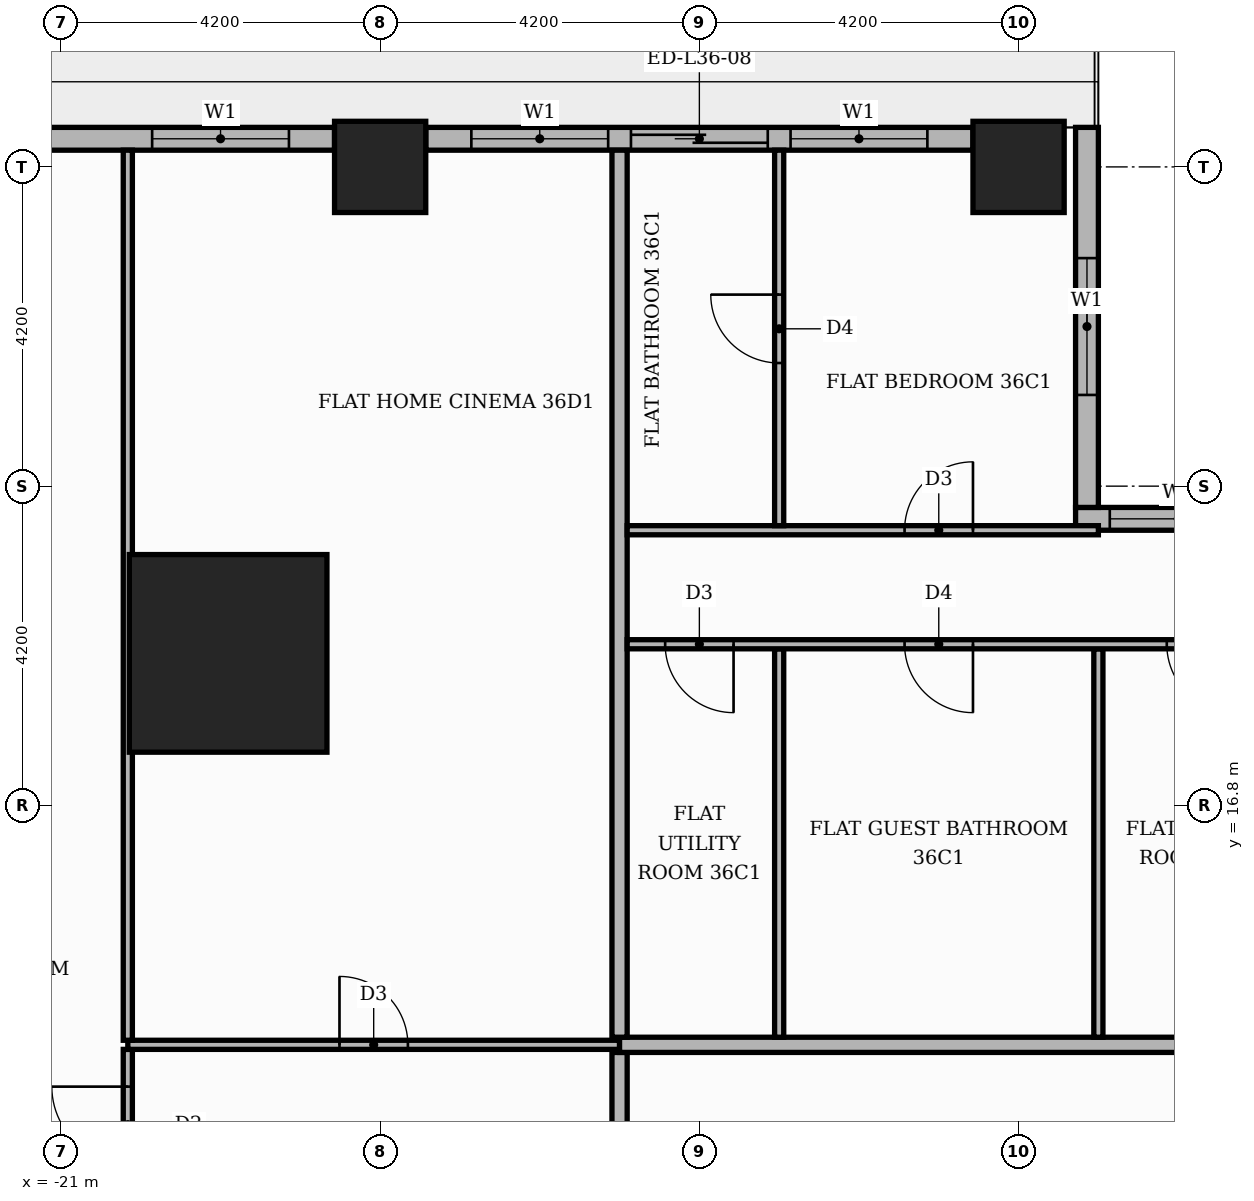
"""IFC4 building model, lengths in metres.
Left out: names, types, materials, properties, quantities, classifications, styles, units other than length and angle.
Written with IfcOpenShell. Run it as: python <this file> out.ifc"""

import sys

from ifc_helpers import new_model, si_unit, direction, frame, frame_2d, origin, origin_2d, place, context, subcontext, project, spatial, rectangle, extrude, element, fill, save


model = new_model("IFC4")
c1 = context("Model", 3, precision=1e-05, world=origin(), true_north=direction((0.0, 1.0)))
c2 = subcontext(c1, "Body", "Model", "MODEL_VIEW")
j1 = project(units=[si_unit("LENGTHUNIT", "METRE"), si_unit("PLANEANGLEUNIT", "RADIAN")], contexts=[c1])
p1 = place(None, origin())
s1 = spatial("IfcSite", under=j1, at=p1, CompositionType="ELEMENT")
p2 = place(p1, origin())
s2 = spatial("IfcBuilding", under=s1, at=p2, CompositionType="ELEMENT")
p3 = place(p2, frame((0.0, 0.0, 153.3)))
s3 = spatial("IfcBuildingStorey", under=s2, at=p3, CompositionType="ELEMENT", Elevation=153.3)
p4 = place(p3, frame((-18.8, 18.8, 0.0), z_axis=(0.0, 0.0, 1.0), x_axis=(1.0, 0.0, 0.0)))
e1 = element("IfcColumn", 1, at=p4, inside=s3, PredefinedType="COLUMN", context=c2, shape_type="SweptSolid", body=[
    extrude(rectangle(XDim=2.6, YDim=2.6, at=origin_2d()), origin(), (0.0, 0.0, 1.0), 3.9),
])
for number, where, z_axis, x_axis in (
    (2, (-8.4, 25.2, 0.0), (0.0, 0.0, 1.0), (1.0, 0.0, 0.0)),
    (3, (-16.8, 25.2, 0.0), (0.0, 0.0, 1.0), (1.0, 0.0, 0.0)),
):
    element("IfcColumn", number, at=place(p3, frame(where, z_axis=z_axis, x_axis=x_axis)), inside=s3, PredefinedType="COLUMN", context=c2, shape_type="SweptSolid", body=[
        extrude(rectangle(XDim=1.2, YDim=1.2, at=origin_2d()), origin(), (0.0, 0.0, 1.0), 3.9),
    ])
p5 = place(p3, frame((7.35, 20.57, 0.0), z_axis=(0.0, 0.0, 1.0), x_axis=(-1.0, 0.0, 0.0)))
e4 = element("IfcWall", 4, at=p5, inside=s3, PredefinedType="STANDARD", context=c2, shape_type="SweptSolid", body=[
    extrude(rectangle(XDim=15.0, YDim=0.3, at=frame_2d((7.5, 0.0))), origin(), (0.0, 0.0, 1.0), 3.48),
])
p6 = place(p5, frame((0.15, 0.0, 0.9)))
e5 = element("IfcOpeningElement", 5, at=p6, cuts=e4, PredefinedType="OPENING", context=c2, shape_type="SweptSolid", body=[
    extrude(rectangle(XDim=6.0, YDim=2.1, at=frame_2d((3.0, 1.05))), frame((0.0, 0.16, 0.0), z_axis=(0.0, -1.0, 0.0), x_axis=(1.0, 0.0, 0.0)), (0.0, 0.0, 1.0), 0.32),
])
p7 = place(p5, frame((6.45, 0.0, 0.9)))
e6 = element("IfcOpeningElement", 6, at=p7, cuts=e4, PredefinedType="OPENING", context=c2, shape_type="SweptSolid", body=[
    extrude(rectangle(XDim=6.0, YDim=2.1, at=frame_2d((3.0, 1.05))), frame((0.0, 0.16, 0.0), z_axis=(0.0, -1.0, 0.0), x_axis=(1.0, 0.0, 0.0)), (0.0, 0.0, 1.0), 0.32),
])
p8 = place(p5, frame((12.75, 0.0, 0.9)))
e7 = element("IfcOpeningElement", 7, at=p8, cuts=e4, PredefinedType="OPENING", context=c2, shape_type="SweptSolid", body=[
    extrude(rectangle(XDim=1.8, YDim=2.1, at=frame_2d((0.9, 1.05))), frame((0.0, 0.16, 0.0), z_axis=(0.0, -1.0, 0.0), x_axis=(1.0, 0.0, 0.0)), (0.0, 0.0, 1.0), 0.32),
])
p9 = place(p3, frame((-7.5, 20.72, 0.0), z_axis=(0.0, 0.0, 1.0), x_axis=(0.0, 1.0, 0.0)))
e8 = element("IfcWall", 8, at=p9, inside=s3, PredefinedType="STANDARD", context=c2, shape_type="SweptSolid", body=[
    extrude(rectangle(XDim=5.0, YDim=0.3, at=frame_2d((2.5, 0.0))), origin(), (0.0, 0.0, 1.0), 3.48),
])
p10 = place(p9, frame((1.48, 0.0, 0.9)))
e9 = element("IfcOpeningElement", 9, at=p10, cuts=e8, PredefinedType="OPENING", context=c2, shape_type="SweptSolid", body=[
    extrude(rectangle(XDim=1.8, YDim=2.1, at=frame_2d((0.9, 1.05))), frame((0.0, 0.16, 0.0), z_axis=(0.0, -1.0, 0.0), x_axis=(1.0, 0.0, 0.0)), (0.0, 0.0, 1.0), 0.32),
])
p11 = place(p3, frame((-9.0, 25.57, 0.0), z_axis=(0.0, 0.0, 1.0), x_axis=(-1.0, 0.0, 0.0)))
e10 = element("IfcWall", 10, at=p11, inside=s3, PredefinedType="STANDARD", context=c2, shape_type="SweptSolid", body=[
    extrude(rectangle(XDim=7.2, YDim=0.3, at=frame_2d((3.6, 0.0))), origin(), (0.0, 0.0, 1.0), 3.48),
])
p12 = place(p11, frame((0.6, 0.0, 0.9)))
e11 = element("IfcOpeningElement", 11, at=p12, cuts=e10, PredefinedType="OPENING", context=c2, shape_type="SweptSolid", body=[
    extrude(rectangle(XDim=1.8, YDim=2.1, at=frame_2d((0.9, 1.05))), frame((0.0, 0.16, 0.0), z_axis=(0.0, -1.0, 0.0), x_axis=(1.0, 0.0, 0.0)), (0.0, 0.0, 1.0), 0.32),
])
p13 = place(p11, frame((2.7, 0.0, 0.0)))
e12 = element("IfcOpeningElement", 12, at=p13, cuts=e10, PredefinedType="OPENING", context=c2, shape_type="SweptSolid", body=[
    extrude(rectangle(XDim=1.8, YDim=2.4, at=frame_2d((0.9, 1.2))), frame((0.0, 0.16, 0.0), z_axis=(0.0, -1.0, 0.0), x_axis=(1.0, 0.0, 0.0)), (0.0, 0.0, 1.0), 0.32),
])
p14 = place(p11, frame((4.8, 0.0, 0.9)))
e13 = element("IfcOpeningElement", 13, at=p14, cuts=e10, PredefinedType="OPENING", context=c2, shape_type="SweptSolid", body=[
    extrude(rectangle(XDim=1.8, YDim=2.1, at=frame_2d((0.9, 1.05))), frame((0.0, 0.16, 0.0), z_axis=(0.0, -1.0, 0.0), x_axis=(1.0, 0.0, 0.0)), (0.0, 0.0, 1.0), 0.32),
])
p15 = place(p3, frame((-17.4, 25.57, 0.0), z_axis=(0.0, 0.0, 1.0), x_axis=(-1.0, 0.0, 0.0)))
e14 = element("IfcWall", 14, at=p15, inside=s3, PredefinedType="STANDARD", context=c2, shape_type="SweptSolid", body=[
    extrude(rectangle(XDim=4.32, YDim=0.3, at=frame_2d((2.16, 0.0))), origin(), (0.0, 0.0, 1.0), 3.48),
])
p16 = place(p15, frame((0.6, 0.0, 0.9)))
e15 = element("IfcOpeningElement", 15, at=p16, cuts=e14, PredefinedType="OPENING", context=c2, shape_type="SweptSolid", body=[
    extrude(rectangle(XDim=1.8, YDim=2.1, at=frame_2d((0.9, 1.05))), frame((0.0, 0.16, 0.0), z_axis=(0.0, -1.0, 0.0), x_axis=(1.0, 0.0, 0.0)), (0.0, 0.0, 1.0), 0.32),
])
p17 = place(p3, frame((-13.65, 11.1, 0.0), z_axis=(0.0, 0.0, 1.0), x_axis=(0.0, 1.0, 0.0)))
e16 = element("IfcWall", 16, at=p17, inside=s3, PredefinedType="PARTITIONING", context=c2, shape_type="SweptSolid", body=[
    extrude(rectangle(XDim=2.45, YDim=0.2, at=frame_2d((1.225, 0.0))), origin(), (0.0, 0.0, 1.0), 3.48),
])
p18 = place(p3, frame((-20.12, 11.61, 0.0), z_axis=(0.0, 0.0, 1.0), x_axis=(0.0, 1.0, 0.0)))
e17 = element("IfcWall", 17, at=p18, inside=s3, PredefinedType="PARTITIONING", context=c2, shape_type="SweptSolid", body=[
    extrude(rectangle(XDim=1.98, YDim=0.12, at=frame_2d((0.99, 0.0))), origin(), (0.0, 0.0, 1.0), 3.48),
])
p19 = place(p18, frame((0.49, 0.0, 0.0)))
e18 = element("IfcOpeningElement", 18, at=p19, cuts=e17, PredefinedType="OPENING", context=c2, shape_type="SweptSolid", body=[
    extrude(rectangle(XDim=1.0, YDim=2.1, at=frame_2d((0.5, 1.05))), frame((0.0, 0.07, 0.0), z_axis=(0.0, -1.0, 0.0), x_axis=(1.0, 0.0, 0.0)), (0.0, 0.0, 1.0), 0.14),
])
p20 = place(p3, frame((-20.12, 13.65, 0.0), z_axis=(0.0, 0.0, 1.0), x_axis=(1.0, 0.0, 0.0)))
e19 = element("IfcWall", 19, at=p20, inside=s3, PredefinedType="PARTITIONING", context=c2, shape_type="SweptSolid", body=[
    extrude(rectangle(XDim=6.47, YDim=0.12, at=frame_2d((3.235, 0.0))), origin(), (0.0, 0.0, 1.0), 3.48),
])
p21 = place(p20, frame((2.785, 0.0, 0.0)))
e20 = element("IfcOpeningElement", 20, at=p21, cuts=e19, PredefinedType="OPENING", context=c2, shape_type="SweptSolid", body=[
    extrude(rectangle(XDim=0.9, YDim=2.1, at=frame_2d((0.45, 1.05))), frame((0.0, 0.07, 0.0), z_axis=(0.0, -1.0, 0.0), x_axis=(1.0, 0.0, 0.0)), (0.0, 0.0, 1.0), 0.14),
])
p22 = place(p3, frame((-13.65, 13.65, 0.0), z_axis=(0.0, 0.0, 1.0), x_axis=(1.0, 0.0, 0.0)))
e21 = element("IfcWall", 21, at=p22, inside=s3, PredefinedType="PARTITIONING", context=c2, shape_type="SweptSolid", body=[
    extrude(rectangle(XDim=39.07, YDim=0.2, at=frame_2d((19.535, 0.0))), origin(), (0.0, 0.0, 1.0), 3.48),
])
p23 = place(p22, frame((23.6, 0.0, 0.0)))
e22 = element("IfcOpeningElement", 22, at=p23, cuts=e21, PredefinedType="OPENING", context=c2, shape_type="SweptSolid", body=[
    extrude(rectangle(XDim=1.1, YDim=2.4, at=frame_2d((0.55, 1.2))), frame((0.0, 0.11, 0.0), z_axis=(0.0, -1.0, 0.0), x_axis=(1.0, 0.0, 0.0)), (0.0, 0.0, 1.0), 0.22),
])
p24 = place(p3, frame((-20.12, 13.71, 0.0), z_axis=(0.0, 0.0, 1.0), x_axis=(0.0, 1.0, 0.0)))
e23 = element("IfcWall", 23, at=p24, inside=s3, PredefinedType="PARTITIONING", context=c2, shape_type="SweptSolid", body=[
    extrude(rectangle(XDim=11.71, YDim=0.12, at=frame_2d((5.855, 0.0))), origin(), (0.0, 0.0, 1.0), 3.48),
])
p25 = place(p3, frame((-13.65, 13.75, 0.0), z_axis=(0.0, 0.0, 1.0), x_axis=(0.0, 1.0, 0.0)))
e24 = element("IfcWall", 24, at=p25, inside=s3, PredefinedType="PARTITIONING", context=c2, shape_type="SweptSolid", body=[
    extrude(rectangle(XDim=11.67, YDim=0.2, at=frame_2d((5.835, 0.0))), origin(), (0.0, 0.0, 1.0), 3.48),
])
for number, where, z_axis, x_axis in (
    (25, (-11.55, 13.75, 0.0), (0.0, 0.0, 1.0), (0.0, 1.0, 0.0)),
    (26, (-7.35, 13.75, 0.0), (0.0, 0.0, 1.0), (0.0, 1.0, 0.0)),
):
    element("IfcWall", number, at=place(p3, frame(where, z_axis=z_axis, x_axis=x_axis)), inside=s3, PredefinedType="PARTITIONING", context=c2, shape_type="SweptSolid", body=[
        extrude(rectangle(XDim=5.11, YDim=0.12, at=frame_2d((2.555, 0.0))), origin(), (0.0, 0.0, 1.0), 3.48),
    ])
p26 = place(p3, frame((-13.55, 18.92, 0.0), z_axis=(0.0, 0.0, 1.0), x_axis=(1.0, 0.0, 0.0)))
e27 = element("IfcWall", 27, at=p26, inside=s3, PredefinedType="PARTITIONING", context=c2, shape_type="SweptSolid", body=[
    extrude(rectangle(XDim=20.9, YDim=0.12, at=frame_2d((10.45, 0.0))), origin(), (0.0, 0.0, 1.0), 3.48),
])
p27 = place(p26, frame((17.3, 0.0, 0.0)))
e28 = element("IfcOpeningElement", 28, at=p27, cuts=e27, PredefinedType="OPENING", context=c2, shape_type="SweptSolid", body=[
    extrude(rectangle(XDim=0.9, YDim=2.1, at=frame_2d((0.45, 1.05))), frame((0.0, 0.07, 0.0), z_axis=(0.0, -1.0, 0.0), x_axis=(1.0, 0.0, 0.0)), (0.0, 0.0, 1.0), 0.14),
])
p28 = place(p26, frame((11.3, 0.0, 0.0)))
e29 = element("IfcOpeningElement", 29, at=p28, cuts=e27, PredefinedType="OPENING", context=c2, shape_type="SweptSolid", body=[
    extrude(rectangle(XDim=0.9, YDim=2.1, at=frame_2d((0.45, 1.05))), frame((0.0, 0.07, 0.0), z_axis=(0.0, -1.0, 0.0), x_axis=(1.0, 0.0, 0.0)), (0.0, 0.0, 1.0), 0.14),
])
p29 = place(p26, frame((7.1, 0.0, 0.0)))
e30 = element("IfcOpeningElement", 30, at=p29, cuts=e27, PredefinedType="OPENING", context=c2, shape_type="SweptSolid", body=[
    extrude(rectangle(XDim=0.9, YDim=2.1, at=frame_2d((0.45, 1.05))), frame((0.0, 0.07, 0.0), z_axis=(0.0, -1.0, 0.0), x_axis=(1.0, 0.0, 0.0)), (0.0, 0.0, 1.0), 0.14),
])
p30 = place(p26, frame((3.65, 0.0, 0.0)))
e31 = element("IfcOpeningElement", 31, at=p30, cuts=e27, PredefinedType="OPENING", context=c2, shape_type="SweptSolid", body=[
    extrude(rectangle(XDim=0.9, YDim=2.1, at=frame_2d((0.45, 1.05))), frame((0.0, 0.07, 0.0), z_axis=(0.0, -1.0, 0.0), x_axis=(1.0, 0.0, 0.0)), (0.0, 0.0, 1.0), 0.14),
])
p31 = place(p26, frame((0.5, 0.0, 0.0)))
e32 = element("IfcOpeningElement", 32, at=p31, cuts=e27, PredefinedType="OPENING", context=c2, shape_type="SweptSolid", body=[
    extrude(rectangle(XDim=0.9, YDim=2.1, at=frame_2d((0.45, 1.05))), frame((0.0, 0.07, 0.0), z_axis=(0.0, -1.0, 0.0), x_axis=(1.0, 0.0, 0.0)), (0.0, 0.0, 1.0), 0.14),
])
p32 = place(p3, frame((-13.55, 20.42, 0.0), z_axis=(0.0, 0.0, 1.0), x_axis=(1.0, 0.0, 0.0)))
e33 = element("IfcWall", 33, at=p32, inside=s3, PredefinedType="PARTITIONING", context=c2, shape_type="SweptSolid", body=[
    extrude(rectangle(XDim=6.2, YDim=0.12, at=frame_2d((3.1, 0.0))), origin(), (0.0, 0.0, 1.0), 3.48),
])
p33 = place(p32, frame((3.65, 0.0, 0.0)))
e34 = element("IfcOpeningElement", 34, at=p33, cuts=e33, PredefinedType="OPENING", context=c2, shape_type="SweptSolid", body=[
    extrude(rectangle(XDim=0.9, YDim=2.1, at=frame_2d((0.45, 1.05))), frame((0.0, 0.07, 0.0), z_axis=(0.0, -1.0, 0.0), x_axis=(1.0, 0.0, 0.0)), (0.0, 0.0, 1.0), 0.14),
])
p34 = place(p3, frame((-11.55, 20.48, 0.0), z_axis=(0.0, 0.0, 1.0), x_axis=(0.0, 1.0, 0.0)))
e35 = element("IfcWall", 35, at=p34, inside=s3, PredefinedType="PARTITIONING", context=c2, shape_type="SweptSolid", body=[
    extrude(rectangle(XDim=4.94, YDim=0.12, at=frame_2d((2.47, 0.0))), origin(), (0.0, 0.0, 1.0), 3.48),
])
p35 = place(p34, frame((2.14, 0.0, 0.0)))
e36 = element("IfcOpeningElement", 36, at=p35, cuts=e35, PredefinedType="OPENING", context=c2, shape_type="SweptSolid", body=[
    extrude(rectangle(XDim=0.9, YDim=2.1, at=frame_2d((0.45, 1.05))), frame((0.0, 0.07, 0.0), z_axis=(0.0, -1.0, 0.0), x_axis=(1.0, 0.0, 0.0)), (0.0, 0.0, 1.0), 0.14),
])
p36 = place(p8, origin())
e37 = element("IfcWindow", 37, at=p36, inside=s3, PartitioningType="SINGLE_PANEL", PredefinedType="WINDOW", context=c2, shape_type="SweptSolid", body=[
    extrude(rectangle(XDim=1.8, YDim=2.1, at=frame_2d((0.9, 1.05))), frame((0.0, 0.03, 0.0), z_axis=(0.0, -1.0, 0.0), x_axis=(1.0, 0.0, 0.0)), (0.0, 0.0, 1.0), 0.06),
])
fill(e7, e37)
p37 = place(p10, origin())
e38 = element("IfcWindow", 38, at=p37, inside=s3, PartitioningType="SINGLE_PANEL", PredefinedType="WINDOW", context=c2, shape_type="SweptSolid", body=[
    extrude(rectangle(XDim=1.8, YDim=2.1, at=frame_2d((0.9, 1.05))), frame((0.0, 0.03, 0.0), z_axis=(0.0, -1.0, 0.0), x_axis=(1.0, 0.0, 0.0)), (0.0, 0.0, 1.0), 0.06),
])
fill(e9, e38)
p38 = place(p12, origin())
e39 = element("IfcWindow", 39, at=p38, inside=s3, PartitioningType="SINGLE_PANEL", PredefinedType="WINDOW", context=c2, shape_type="SweptSolid", body=[
    extrude(rectangle(XDim=1.8, YDim=2.1, at=frame_2d((0.9, 1.05))), frame((0.0, 0.03, 0.0), z_axis=(0.0, -1.0, 0.0), x_axis=(1.0, 0.0, 0.0)), (0.0, 0.0, 1.0), 0.06),
])
fill(e11, e39)
p39 = place(p13, origin())
e40 = element("IfcDoor", 40, at=p39, inside=s3, OperationType="SLIDING_TO_RIGHT", PredefinedType="DOOR", context=c2, shape_type="SweptSolid", body=[
    extrude(rectangle(XDim=1.8, YDim=2.4, at=frame_2d((0.9, 1.2))), frame((0.0, 0.025, 0.0), z_axis=(0.0, -1.0, 0.0), x_axis=(1.0, 0.0, 0.0)), (0.0, 0.0, 1.0), 0.05),
])
fill(e12, e40)
p40 = place(p14, origin())
e41 = element("IfcWindow", 41, at=p40, inside=s3, PartitioningType="SINGLE_PANEL", PredefinedType="WINDOW", context=c2, shape_type="SweptSolid", body=[
    extrude(rectangle(XDim=1.8, YDim=2.1, at=frame_2d((0.9, 1.05))), frame((0.0, 0.03, 0.0), z_axis=(0.0, -1.0, 0.0), x_axis=(1.0, 0.0, 0.0)), (0.0, 0.0, 1.0), 0.06),
])
fill(e13, e41)
p41 = place(p16, origin())
e42 = element("IfcWindow", 42, at=p41, inside=s3, PartitioningType="SINGLE_PANEL", PredefinedType="WINDOW", context=c2, shape_type="SweptSolid", body=[
    extrude(rectangle(XDim=1.8, YDim=2.1, at=frame_2d((0.9, 1.05))), frame((0.0, 0.03, 0.0), z_axis=(0.0, -1.0, 0.0), x_axis=(1.0, 0.0, 0.0)), (0.0, 0.0, 1.0), 0.06),
])
fill(e15, e42)
p42 = place(p29, frame((0.9, 0.0, 0.0), z_axis=(0.0, 0.0, 1.0), x_axis=(-1.0, 0.0, 0.0)))
e43 = element("IfcDoor", 43, at=p42, inside=s3, OperationType="SINGLE_SWING_RIGHT", PredefinedType="DOOR", context=c2, shape_type="SweptSolid", body=[
    extrude(rectangle(XDim=0.9, YDim=2.1, at=frame_2d((0.45, 1.05))), frame((0.0, 0.025, 0.0), z_axis=(0.0, -1.0, 0.0), x_axis=(1.0, 0.0, 0.0)), (0.0, 0.0, 1.0), 0.05),
])
fill(e30, e43)
p43 = place(p30, frame((0.9, 0.0, 0.0), z_axis=(0.0, 0.0, 1.0), x_axis=(-1.0, 0.0, 0.0)))
e44 = element("IfcDoor", 44, at=p43, inside=s3, OperationType="SINGLE_SWING_RIGHT", PredefinedType="DOOR", context=c2, shape_type="SweptSolid", body=[
    extrude(rectangle(XDim=0.9, YDim=2.1, at=frame_2d((0.45, 1.05))), frame((0.0, 0.025, 0.0), z_axis=(0.0, -1.0, 0.0), x_axis=(1.0, 0.0, 0.0)), (0.0, 0.0, 1.0), 0.05),
])
fill(e31, e44)
p44 = place(p31, frame((0.9, 0.0, 0.0), z_axis=(0.0, 0.0, 1.0), x_axis=(-1.0, 0.0, 0.0)))
e45 = element("IfcDoor", 45, at=p44, inside=s3, OperationType="SINGLE_SWING_RIGHT", PredefinedType="DOOR", context=c2, shape_type="SweptSolid", body=[
    extrude(rectangle(XDim=0.9, YDim=2.1, at=frame_2d((0.45, 1.05))), frame((0.0, 0.025, 0.0), z_axis=(0.0, -1.0, 0.0), x_axis=(1.0, 0.0, 0.0)), (0.0, 0.0, 1.0), 0.05),
])
fill(e32, e45)
p45 = place(p33, origin())
e46 = element("IfcDoor", 46, at=p45, inside=s3, OperationType="SINGLE_SWING_RIGHT", PredefinedType="DOOR", context=c2, shape_type="SweptSolid", body=[
    extrude(rectangle(XDim=0.9, YDim=2.1, at=frame_2d((0.45, 1.05))), frame((0.0, 0.025, 0.0), z_axis=(0.0, -1.0, 0.0), x_axis=(1.0, 0.0, 0.0)), (0.0, 0.0, 1.0), 0.05),
])
fill(e34, e46)
p46 = place(p35, origin())
e47 = element("IfcDoor", 47, at=p46, inside=s3, OperationType="SINGLE_SWING_RIGHT", PredefinedType="DOOR", context=c2, shape_type="SweptSolid", body=[
    extrude(rectangle(XDim=0.9, YDim=2.1, at=frame_2d((0.45, 1.05))), frame((0.0, 0.025, 0.0), z_axis=(0.0, -1.0, 0.0), x_axis=(1.0, 0.0, 0.0)), (0.0, 0.0, 1.0), 0.05),
])
fill(e36, e47)
p47 = place(p21, origin())
e48 = element("IfcDoor", 48, at=p47, inside=s3, OperationType="SINGLE_SWING_LEFT", PredefinedType="DOOR", context=c2, shape_type="SweptSolid", body=[
    extrude(rectangle(XDim=0.9, YDim=2.1, at=frame_2d((0.45, 1.05))), frame((0.0, 0.025, 0.0), z_axis=(0.0, -1.0, 0.0), x_axis=(1.0, 0.0, 0.0)), (0.0, 0.0, 1.0), 0.05),
])
fill(e20, e48)
p48 = place(p19, origin())
e49 = element("IfcDoor", 49, at=p48, inside=s3, OperationType="SINGLE_SWING_RIGHT", PredefinedType="DOOR", context=c2, shape_type="SweptSolid", body=[
    extrude(rectangle(XDim=1.0, YDim=2.1, at=frame_2d((0.5, 1.05))), frame((0.0, 0.025, 0.0), z_axis=(0.0, -1.0, 0.0), x_axis=(1.0, 0.0, 0.0)), (0.0, 0.0, 1.0), 0.05),
])
fill(e18, e49)
save(model, sys.argv[1])
